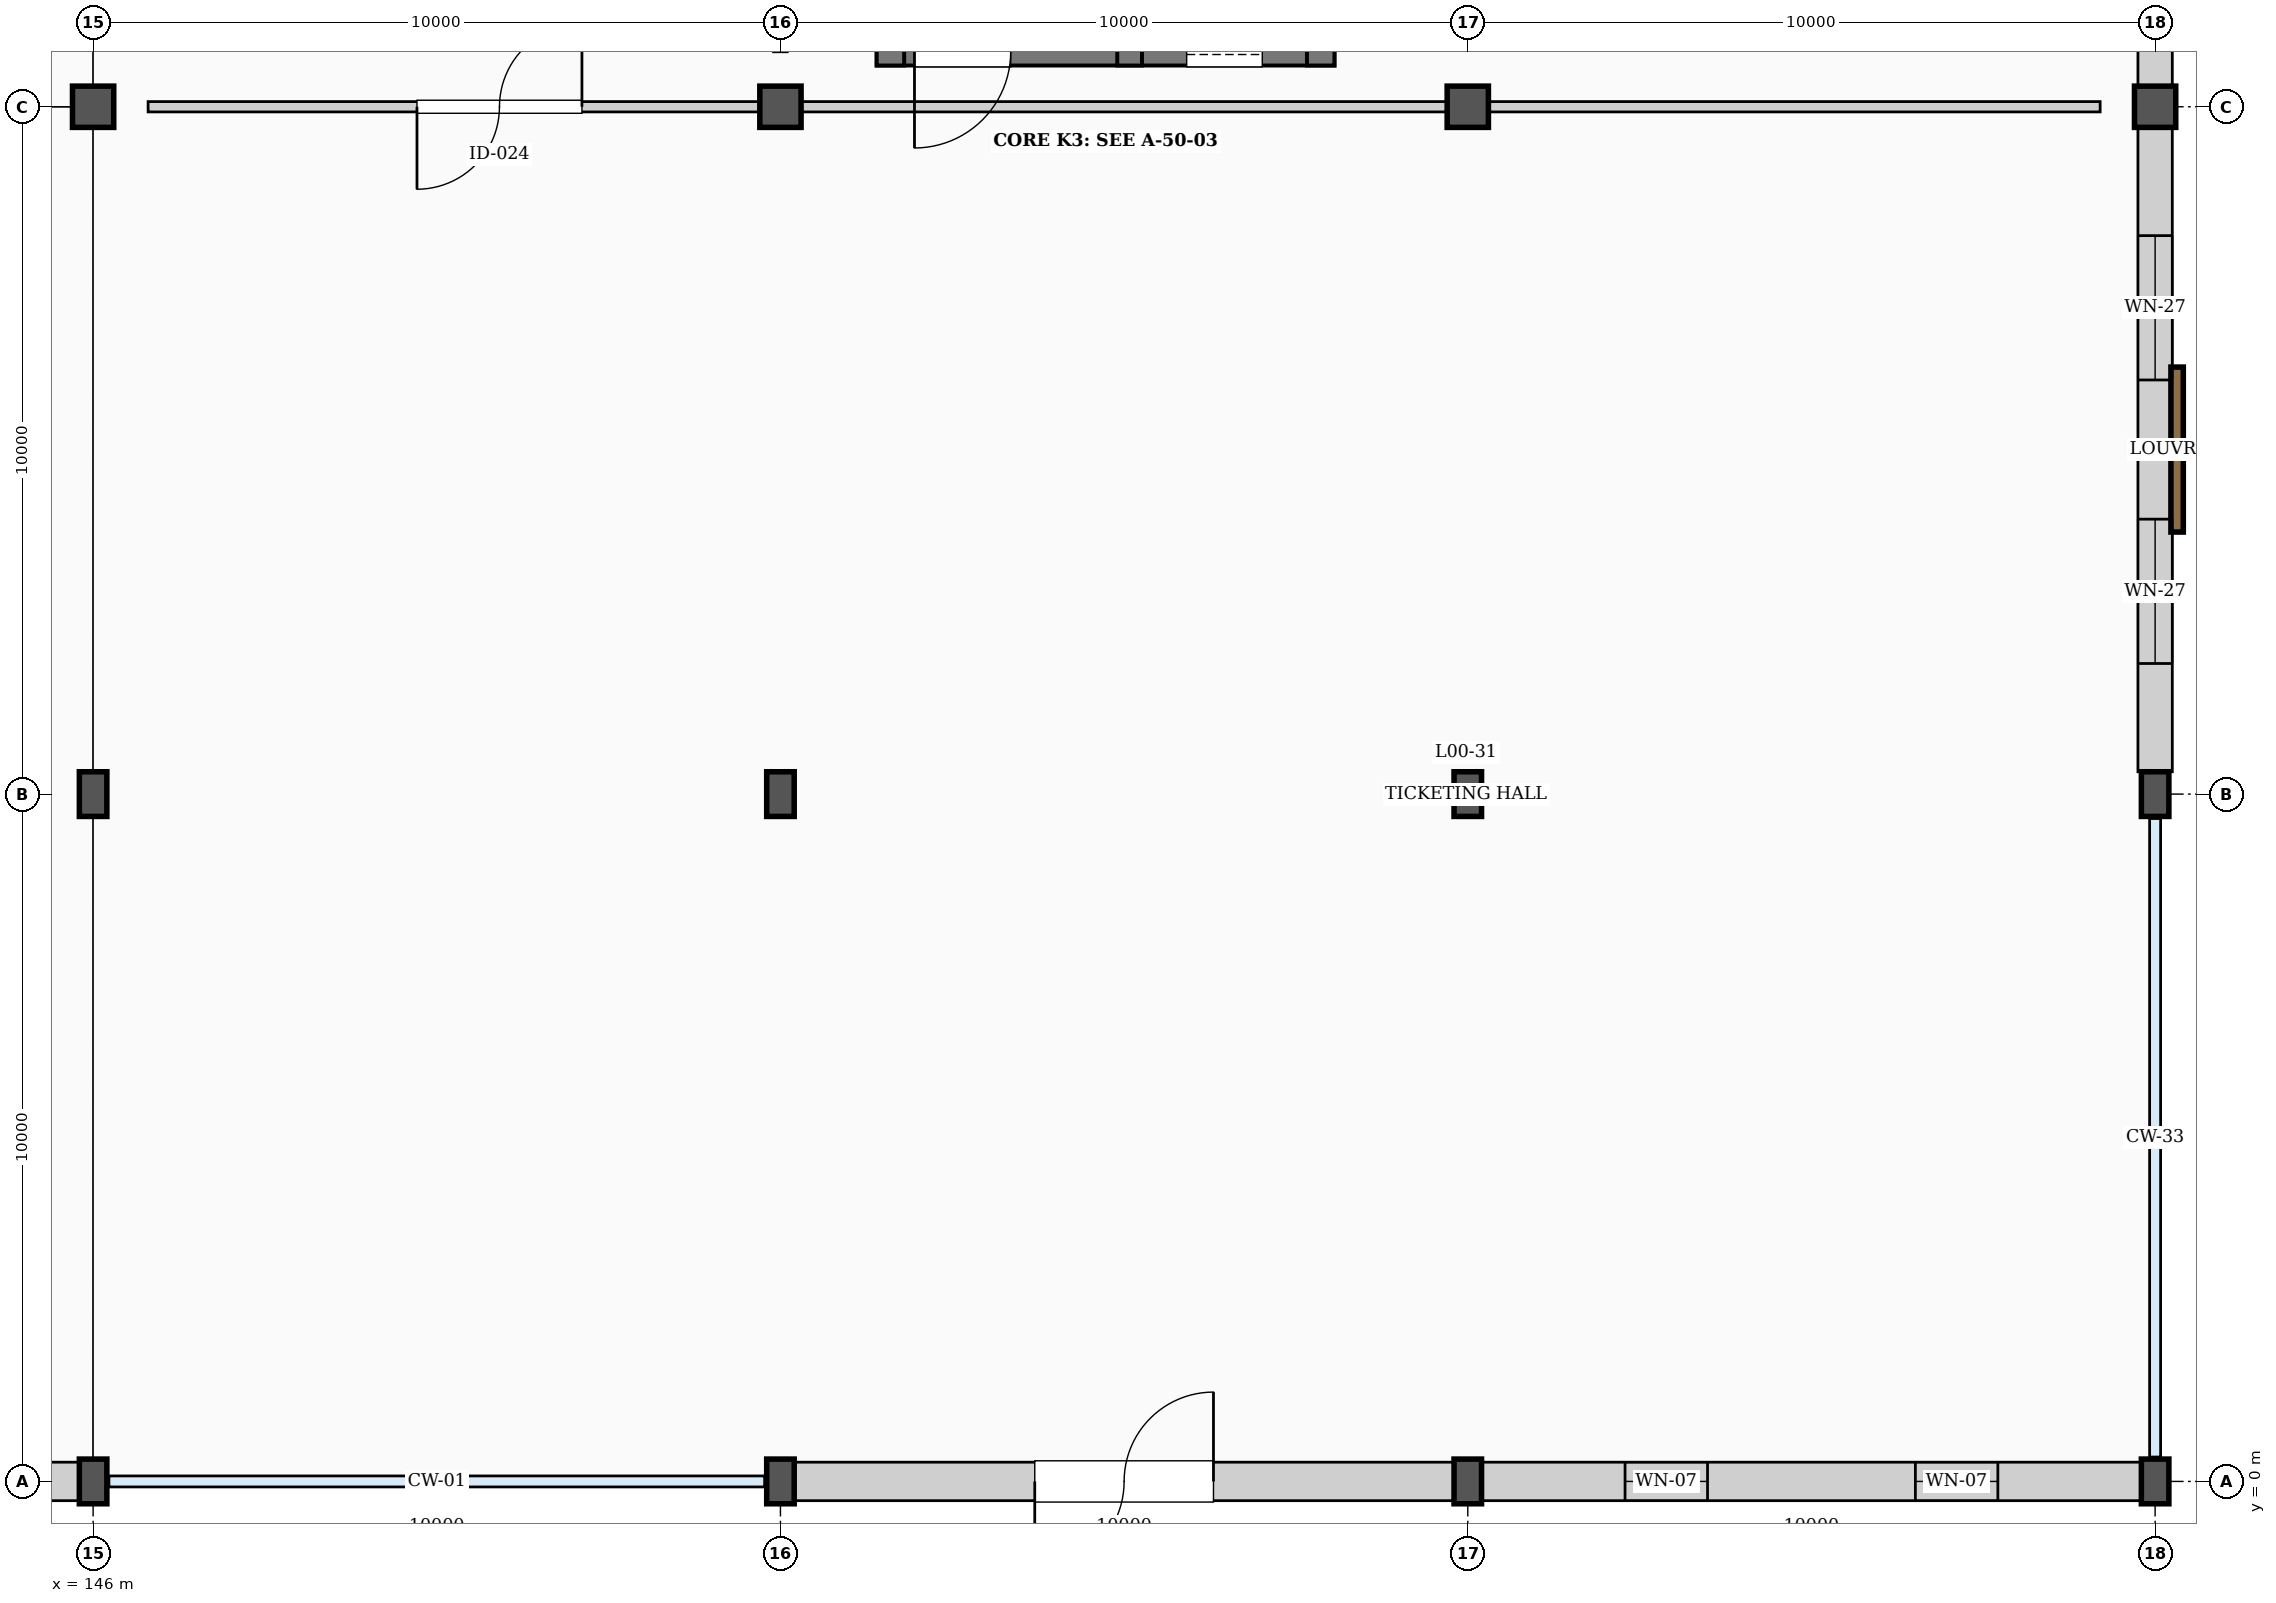
"""IFC4 building model, lengths in metres.
Left out: names, types, materials, properties, quantities, classifications, styles, units other than length and angle.
Written with IfcOpenShell. Run it as: python <this file> out.ifc"""

import sys

from ifc_helpers import new_model, si_unit, direction, frame, frame_2d, origin, origin_2d, place, context, subcontext, project, spatial, rectangle, extrude, element, fill, save


model = new_model("IFC4")
c1 = context("Model", 3, precision=1e-05, world=origin(), true_north=direction((0.0, 1.0)))
c2 = subcontext(c1, "Body", "Model", "MODEL_VIEW")
j1 = project(units=[si_unit("LENGTHUNIT", "METRE"), si_unit("PLANEANGLEUNIT", "RADIAN")], contexts=[c1])
p1 = place(None, origin())
s1 = spatial("IfcSite", under=j1, at=p1, CompositionType="ELEMENT")
p2 = place(p1, origin())
s2 = spatial("IfcBuilding", under=s1, at=p2, CompositionType="ELEMENT")
p3 = place(p2, origin())
s3 = spatial("IfcBuildingStorey", under=s2, at=p3, CompositionType="ELEMENT", Elevation=0.0)
for number, where, z_axis, x_axis in (
    (1, (146.0, 0.0, 0.0), (0.0, 0.0, 1.0), (1.0, 0.0, 0.0)),
    (2, (146.0, 10.0, 0.0), (0.0, 0.0, 1.0), (1.0, 0.0, 0.0)),
):
    element("IfcColumn", number, at=place(p3, frame(where, z_axis=z_axis, x_axis=x_axis)), inside=s3, PredefinedType="COLUMN", context=c2, shape_type="SweptSolid", body=[
        extrude(rectangle(XDim=0.4, YDim=0.65, at=origin_2d()), origin(), (0.0, 0.0, 1.0), 5.4),
    ])
p4 = place(p3, frame((146.0, 20.0, 0.0), z_axis=(0.0, 0.0, 1.0), x_axis=(1.0, 0.0, 0.0)))
e3 = element("IfcColumn", 3, at=p4, inside=s3, PredefinedType="COLUMN", context=c2, shape_type="SweptSolid", body=[
    extrude(rectangle(XDim=0.6, YDim=0.6, at=origin_2d()), origin(), (0.0, 0.0, 1.0), 5.4),
])
for number, where, z_axis, x_axis in (
    (4, (156.0, 0.0, 0.0), (0.0, 0.0, 1.0), (1.0, 0.0, 0.0)),
    (5, (156.0, 10.0, 0.0), (0.0, 0.0, 1.0), (1.0, 0.0, 0.0)),
):
    element("IfcColumn", number, at=place(p3, frame(where, z_axis=z_axis, x_axis=x_axis)), inside=s3, PredefinedType="COLUMN", context=c2, shape_type="SweptSolid", body=[
        extrude(rectangle(XDim=0.4, YDim=0.65, at=origin_2d()), origin(), (0.0, 0.0, 1.0), 5.4),
    ])
p5 = place(p3, frame((156.0, 20.0, 0.0), z_axis=(0.0, 0.0, 1.0), x_axis=(1.0, 0.0, 0.0)))
e6 = element("IfcColumn", 6, at=p5, inside=s3, PredefinedType="COLUMN", context=c2, shape_type="SweptSolid", body=[
    extrude(rectangle(XDim=0.6, YDim=0.6, at=origin_2d()), origin(), (0.0, 0.0, 1.0), 5.4),
])
for number, where, z_axis, x_axis in (
    (7, (166.0, 0.0, 0.0), (0.0, 0.0, 1.0), (1.0, 0.0, 0.0)),
    (8, (166.0, 10.0, 0.0), (0.0, 0.0, 1.0), (1.0, 0.0, 0.0)),
):
    element("IfcColumn", number, at=place(p3, frame(where, z_axis=z_axis, x_axis=x_axis)), inside=s3, PredefinedType="COLUMN", context=c2, shape_type="SweptSolid", body=[
        extrude(rectangle(XDim=0.4, YDim=0.65, at=origin_2d()), origin(), (0.0, 0.0, 1.0), 5.4),
    ])
p6 = place(p3, frame((166.0, 20.0, 0.0), z_axis=(0.0, 0.0, 1.0), x_axis=(1.0, 0.0, 0.0)))
e9 = element("IfcColumn", 9, at=p6, inside=s3, PredefinedType="COLUMN", context=c2, shape_type="SweptSolid", body=[
    extrude(rectangle(XDim=0.6, YDim=0.6, at=origin_2d()), origin(), (0.0, 0.0, 1.0), 5.4),
])
for number, where, z_axis, x_axis in (
    (10, (176.0, 0.0, 0.0), (0.0, 0.0, 1.0), (1.0, 0.0, 0.0)),
    (11, (176.0, 10.0, 0.0), (0.0, 0.0, 1.0), (1.0, 0.0, 0.0)),
):
    element("IfcColumn", number, at=place(p3, frame(where, z_axis=z_axis, x_axis=x_axis)), inside=s3, PredefinedType="COLUMN", context=c2, shape_type="SweptSolid", body=[
        extrude(rectangle(XDim=0.4, YDim=0.65, at=origin_2d()), origin(), (0.0, 0.0, 1.0), 5.4),
    ])
p7 = place(p3, frame((176.0, 20.0, 0.0), z_axis=(0.0, 0.0, 1.0), x_axis=(1.0, 0.0, 0.0)))
e12 = element("IfcColumn", 12, at=p7, inside=s3, PredefinedType="COLUMN", context=c2, shape_type="SweptSolid", body=[
    extrude(rectangle(XDim=0.6, YDim=0.6, at=origin_2d()), origin(), (0.0, 0.0, 1.0), 5.4),
])
p8 = place(p3, frame((136.2, 0.0, 0.0), z_axis=(0.0, 0.0, 1.0), x_axis=(1.0, 0.0, 0.0)))
e13 = element("IfcWall", 13, at=p8, inside=s3, PredefinedType="SOLIDWALL", context=c2, shape_type="SweptSolid", body=[
    extrude(rectangle(XDim=9.6, YDim=0.56, at=frame_2d((4.8, 0.0))), origin(), (0.0, 0.0, 1.0), 4.58),
])
p9 = place(p8, frame((0.9, 0.0, 0.0)))
e14 = element("IfcOpeningElement", 14, at=p9, cuts=e13, PredefinedType="OPENING", context=c2, shape_type="SweptSolid", body=[
    extrude(rectangle(XDim=2.4, YDim=2.5, at=frame_2d((1.2, 1.25))), frame((0.0, 0.29, 0.0), z_axis=(0.0, -1.0, 0.0), x_axis=(1.0, 0.0, 0.0)), (0.0, 0.0, 1.0), 0.58),
])
p10 = place(p3, frame((156.2, 0.0, 0.0), z_axis=(0.0, 0.0, 1.0), x_axis=(1.0, 0.0, 0.0)))
e15 = element("IfcWall", 15, at=p10, inside=s3, PredefinedType="SOLIDWALL", context=c2, shape_type="SweptSolid", body=[
    extrude(rectangle(XDim=9.6, YDim=0.56, at=frame_2d((4.8, 0.0))), origin(), (0.0, 0.0, 1.0), 4.6),
])
p11 = place(p10, frame((3.5, 0.0, 0.0)))
e16 = element("IfcOpeningElement", 16, at=p11, cuts=e15, PredefinedType="OPENING", context=c2, shape_type="SweptSolid", body=[
    extrude(rectangle(XDim=2.6, YDim=2.6, at=frame_2d((1.3, 1.3))), frame((0.0, 0.29, 0.0), z_axis=(0.0, -1.0, 0.0), x_axis=(1.0, 0.0, 0.0)), (0.0, 0.0, 1.0), 0.58),
])
p12 = place(p3, frame((166.2, 0.0, 0.0), z_axis=(0.0, 0.0, 1.0), x_axis=(1.0, 0.0, 0.0)))
e17 = element("IfcWall", 17, at=p12, inside=s3, PredefinedType="SOLIDWALL", context=c2, shape_type="SweptSolid", body=[
    extrude(rectangle(XDim=9.6, YDim=0.56, at=frame_2d((4.8, 0.0))), origin(), (0.0, 0.0, 1.0), 4.6),
])
p13 = place(p12, frame((2.088, 0.0, 0.9)))
e18 = element("IfcOpeningElement", 18, at=p13, cuts=e17, PredefinedType="OPENING", context=c2, shape_type="SweptSolid", body=[
    extrude(rectangle(XDim=1.2, YDim=2.1, at=frame_2d((0.6, 1.05))), frame((0.0, 0.29, 0.0), z_axis=(0.0, -1.0, 0.0), x_axis=(1.0, 0.0, 0.0)), (0.0, 0.0, 1.0), 0.58),
])
p14 = place(p12, frame((6.312, 0.0, 0.9)))
e19 = element("IfcOpeningElement", 19, at=p14, cuts=e17, PredefinedType="OPENING", context=c2, shape_type="SweptSolid", body=[
    extrude(rectangle(XDim=1.2, YDim=2.1, at=frame_2d((0.6, 1.05))), frame((0.0, 0.29, 0.0), z_axis=(0.0, -1.0, 0.0), x_axis=(1.0, 0.0, 0.0)), (0.0, 0.0, 1.0), 0.58),
])
p15 = place(p3, frame((176.0, 19.7, 0.0), z_axis=(0.0, 0.0, 1.0), x_axis=(0.0, -1.0, 0.0)))
e20 = element("IfcWall", 20, at=p15, inside=s3, PredefinedType="SOLIDWALL", context=c2, shape_type="SweptSolid", body=[
    extrude(rectangle(XDim=9.375, YDim=0.5, at=frame_2d((4.688, 0.0))), origin(), (0.0, 0.0, 1.0), 4.69),
])
p16 = place(p15, frame((1.575, 0.0, 0.9)))
e21 = element("IfcOpeningElement", 21, at=p16, cuts=e20, PredefinedType="OPENING", context=c2, shape_type="SweptSolid", body=[
    extrude(rectangle(XDim=2.1, YDim=2.7, at=frame_2d((1.05, 1.35))), frame((0.0, 0.26, 0.0), z_axis=(0.0, -1.0, 0.0), x_axis=(1.0, 0.0, 0.0)), (0.0, 0.0, 1.0), 0.52),
])
p17 = place(p15, frame((5.7, 0.0, 0.9)))
e22 = element("IfcOpeningElement", 22, at=p17, cuts=e20, PredefinedType="OPENING", context=c2, shape_type="SweptSolid", body=[
    extrude(rectangle(XDim=2.1, YDim=2.7, at=frame_2d((1.05, 1.35))), frame((0.0, 0.26, 0.0), z_axis=(0.0, -1.0, 0.0), x_axis=(1.0, 0.0, 0.0)), (0.0, 0.0, 1.0), 0.52),
])
p18 = place(p3, frame((176.0, 29.7, 0.0), z_axis=(0.0, 0.0, 1.0), x_axis=(0.0, -1.0, 0.0)))
e23 = element("IfcWall", 23, at=p18, inside=s3, PredefinedType="SOLIDWALL", context=c2, shape_type="SweptSolid", body=[
    extrude(rectangle(XDim=9.4, YDim=0.5, at=frame_2d((4.7, 0.0))), origin(), (0.0, 0.0, 1.0), 4.69),
])
p19 = place(p18, frame((3.5, 0.0, 0.0)))
e24 = element("IfcOpeningElement", 24, at=p19, cuts=e23, PredefinedType="OPENING", context=c2, shape_type="SweptSolid", body=[
    extrude(rectangle(XDim=2.4, YDim=2.5, at=frame_2d((1.2, 1.25))), frame((0.0, 0.26, 0.0), z_axis=(0.0, -1.0, 0.0), x_axis=(1.0, 0.0, 0.0)), (0.0, 0.0, 1.0), 0.52),
])
p20 = place(p3, frame((157.4, 20.8, 0.0), z_axis=(0.0, 0.0, 1.0), x_axis=(1.0, 0.0, 0.0)))
e25 = element("IfcWall", 25, at=p20, inside=s3, PredefinedType="SHEAR", context=c2, shape_type="SweptSolid", body=[
    extrude(rectangle(XDim=6.66, YDim=0.4, at=frame_2d((3.33, 0.0))), origin(), (0.0, 0.0, 1.0), 5.4),
])
p21 = place(p20, frame((0.55, 0.0, 0.0)))
e26 = element("IfcOpeningElement", 26, at=p21, cuts=e25, PredefinedType="OPENING", context=c2, shape_type="SweptSolid", body=[
    extrude(rectangle(XDim=1.4, YDim=2.35, at=frame_2d((0.7, 1.175))), frame((0.0, 0.21, 0.0), z_axis=(0.0, -1.0, 0.0), x_axis=(1.0, 0.0, 0.0)), (0.0, 0.0, 1.0), 0.42),
])
p22 = place(p20, frame((4.51, 0.0, 0.0)))
e27 = element("IfcOpeningElement", 27, at=p22, cuts=e25, PredefinedType="OPENING", context=c2, shape_type="SweptSolid", body=[
    extrude(rectangle(XDim=1.1, YDim=2.3, at=frame_2d((0.55, 1.15))), frame((0.0, 0.21, 0.0), z_axis=(0.0, -1.0, 0.0), x_axis=(1.0, 0.0, 0.0)), (0.0, 0.0, 1.0), 0.42),
])
for number, where, z_axis, x_axis in (
    (28, (157.6, 20.6, 0.0), (0.0, 0.0, 1.0), (0.0, 1.0, 0.0)),
    (29, (163.86, 20.6, 0.0), (0.0, 0.0, 1.0), (0.0, 1.0, 0.0)),
):
    element("IfcWall", number, at=place(p3, frame(where, z_axis=z_axis, x_axis=x_axis)), inside=s3, PredefinedType="SHEAR", context=c2, shape_type="SweptSolid", body=[
        extrude(rectangle(XDim=8.8, YDim=0.4, at=frame_2d((4.4, 0.0))), origin(), (0.0, 0.0, 1.0), 5.4),
    ])
p23 = place(p3, frame((161.08, 20.6, 0.0), z_axis=(0.0, 0.0, 1.0), x_axis=(0.0, 1.0, 0.0)))
e30 = element("IfcWall", 30, at=p23, inside=s3, PredefinedType="SHEAR", context=c2, shape_type="SweptSolid", body=[
    extrude(rectangle(XDim=8.8, YDim=0.36, at=frame_2d((4.4, 0.0))), origin(), (0.0, 0.0, 1.0), 5.4),
])
p24 = place(p3, frame((146.8, 20.0, 0.0), z_axis=(0.0, 0.0, 1.0), x_axis=(1.0, 0.0, 0.0)))
e31 = element("IfcWall", 31, at=p24, inside=s3, PredefinedType="PARTITIONING", context=c2, shape_type="SweptSolid", body=[
    extrude(rectangle(XDim=28.4, YDim=0.15, at=frame_2d((14.2, 0.0))), origin(), (0.0, 0.0, 1.0), 4.54),
])
p25 = place(p24, frame((3.912, 0.0, 0.0)))
e32 = element("IfcOpeningElement", 32, at=p25, cuts=e31, PredefinedType="OPENING", context=c2, shape_type="SweptSolid", body=[
    extrude(rectangle(XDim=2.4, YDim=2.6, at=frame_2d((1.2, 1.3))), frame((0.0, 0.085, 0.0), z_axis=(0.0, -1.0, 0.0), x_axis=(1.0, 0.0, 0.0)), (0.0, 0.0, 1.0), 0.17),
])
p26 = place(p11, origin())
e33 = element("IfcDoor", 33, at=p26, inside=s3, OperationType="DOUBLE_DOOR_SINGLE_SWING", PredefinedType="DOOR", context=c2, shape_type="SweptSolid", body=[
    extrude(rectangle(XDim=2.6, YDim=2.6, at=frame_2d((1.3, 1.3))), frame((0.0, 0.025, 0.0), z_axis=(0.0, -1.0, 0.0), x_axis=(1.0, 0.0, 0.0)), (0.0, 0.0, 1.0), 0.05),
])
fill(e16, e33)
p27 = place(p13, origin())
e34 = element("IfcWindow", 34, at=p27, inside=s3, PartitioningType="SINGLE_PANEL", PredefinedType="WINDOW", context=c2, shape_type="SweptSolid", body=[
    extrude(rectangle(XDim=1.2, YDim=2.1, at=frame_2d((0.6, 1.05))), frame((0.0, 0.03, 0.0), z_axis=(0.0, -1.0, 0.0), x_axis=(1.0, 0.0, 0.0)), (0.0, 0.0, 1.0), 0.06),
])
fill(e18, e34)
p28 = place(p14, origin())
e35 = element("IfcWindow", 35, at=p28, inside=s3, PartitioningType="SINGLE_PANEL", PredefinedType="WINDOW", context=c2, shape_type="SweptSolid", body=[
    extrude(rectangle(XDim=1.2, YDim=2.1, at=frame_2d((0.6, 1.05))), frame((0.0, 0.03, 0.0), z_axis=(0.0, -1.0, 0.0), x_axis=(1.0, 0.0, 0.0)), (0.0, 0.0, 1.0), 0.06),
])
fill(e19, e35)
p29 = place(p16, origin())
e36 = element("IfcWindow", 36, at=p29, inside=s3, PartitioningType="SINGLE_PANEL", PredefinedType="WINDOW", context=c2, shape_type="SweptSolid", body=[
    extrude(rectangle(XDim=2.1, YDim=2.7, at=frame_2d((1.05, 1.35))), frame((0.0, 0.03, 0.0), z_axis=(0.0, -1.0, 0.0), x_axis=(1.0, 0.0, 0.0)), (0.0, 0.0, 1.0), 0.06),
])
fill(e21, e36)
p30 = place(p17, origin())
e37 = element("IfcWindow", 37, at=p30, inside=s3, PartitioningType="SINGLE_PANEL", PredefinedType="WINDOW", context=c2, shape_type="SweptSolid", body=[
    extrude(rectangle(XDim=2.1, YDim=2.7, at=frame_2d((1.05, 1.35))), frame((0.0, 0.03, 0.0), z_axis=(0.0, -1.0, 0.0), x_axis=(1.0, 0.0, 0.0)), (0.0, 0.0, 1.0), 0.06),
])
fill(e22, e37)
p31 = place(p21, origin())
e38 = element("IfcDoor", 38, at=p31, inside=s3, OperationType="SINGLE_SWING_LEFT", PredefinedType="DOOR", context=c2, shape_type="SweptSolid", body=[
    extrude(rectangle(XDim=1.4, YDim=2.35, at=frame_2d((0.7, 1.175))), frame((0.0, 0.025, 0.0), z_axis=(0.0, -1.0, 0.0), x_axis=(1.0, 0.0, 0.0)), (0.0, 0.0, 1.0), 0.05),
])
fill(e26, e38)
p32 = place(p22, origin())
e39 = element("IfcDoor", 39, at=p32, inside=s3, OperationType="SLIDING_TO_LEFT", PredefinedType="DOOR", context=c2, shape_type="SweptSolid", body=[
    extrude(rectangle(XDim=1.1, YDim=2.3, at=frame_2d((0.55, 1.15))), frame((0.0, 0.025, 0.0), z_axis=(0.0, -1.0, 0.0), x_axis=(1.0, 0.0, 0.0)), (0.0, 0.0, 1.0), 0.05),
])
fill(e27, e39)
p33 = place(p25, origin())
e40 = element("IfcDoor", 40, at=p33, inside=s3, OperationType="DOUBLE_DOOR_SINGLE_SWING", PredefinedType="DOOR", context=c2, shape_type="SweptSolid", body=[
    extrude(rectangle(XDim=2.4, YDim=2.6, at=frame_2d((1.2, 1.3))), frame((0.0, 0.025, 0.0), z_axis=(0.0, -1.0, 0.0), x_axis=(1.0, 0.0, 0.0)), (0.0, 0.0, 1.0), 0.05),
])
fill(e32, e40)
save(model, sys.argv[1])
